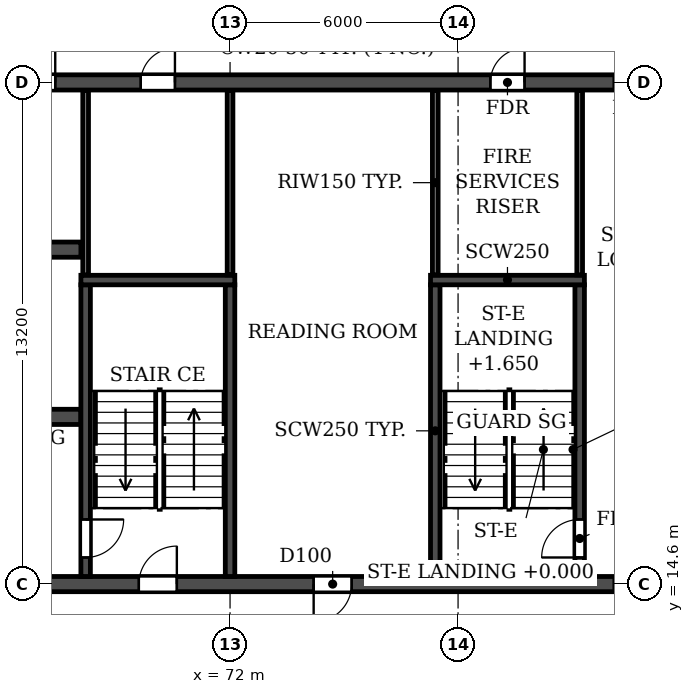
"""IFC4 building model, lengths in metres.
Left out: names, types, materials, properties, quantities, classifications, styles, units other than length and angle.
Written with IfcOpenShell. Run it as: python <this file> out.ifc"""

import sys

from ifc_helpers import new_model, si_unit, direction, frame, frame_2d, origin, place, context, subcontext, project, spatial, rectangle, extrude, element, fill, save


model = new_model("IFC4")
c1 = context("Model", 3, precision=1e-05, world=origin(), true_north=direction((0.0, 1.0)))
c2 = subcontext(c1, "Body", "Model", "MODEL_VIEW")
j1 = project(units=[si_unit("LENGTHUNIT", "METRE"), si_unit("PLANEANGLEUNIT", "RADIAN")], contexts=[c1])
p1 = place(None, origin())
s1 = spatial("IfcSite", under=j1, at=p1, CompositionType="ELEMENT")
p2 = place(p1, origin())
s2 = spatial("IfcBuilding", under=s1, at=p2, CompositionType="ELEMENT")
p3 = place(p2, frame((0.0, 0.0, 191.7)))
s3 = spatial("IfcBuildingStorey", under=s2, at=p3, CompositionType="ELEMENT", Elevation=191.7)
p4 = place(p3, frame((18.2, 14.6, 0.0), z_axis=(0.0, 0.0, 1.0), x_axis=(1.0, 0.0, 0.0)))
e1 = element("IfcWall", 1, at=p4, inside=s3, PredefinedType="SOLIDWALL", context=c2, shape_type="SweptSolid", body=[
    extrude(rectangle(XDim=65.6, YDim=0.4, at=frame_2d((32.8, 0.0))), origin(), (0.0, 0.0, 1.0), 3.08),
])
p5 = place(p4, frame((0.7, 0.0, 0.0)))
e2 = element("IfcOpeningElement", 2, at=p5, cuts=e1, PredefinedType="OPENING", context=c2, shape_type="SweptSolid", body=[
    extrude(rectangle(XDim=1.0, YDim=2.1, at=frame_2d((0.5, 1.05))), frame((0.0, 0.21, 0.0), z_axis=(0.0, -1.0, 0.0), x_axis=(1.0, 0.0, 0.0)), (0.0, 0.0, 1.0), 0.42),
])
p6 = place(p4, frame((8.6, 0.0, 0.0)))
e3 = element("IfcOpeningElement", 3, at=p6, cuts=e1, PredefinedType="OPENING", context=c2, shape_type="SweptSolid", body=[
    extrude(rectangle(XDim=1.0, YDim=2.1, at=frame_2d((0.5, 1.05))), frame((0.0, 0.21, 0.0), z_axis=(0.0, -1.0, 0.0), x_axis=(1.0, 0.0, 0.0)), (0.0, 0.0, 1.0), 0.42),
])
p7 = place(p4, frame((13.2, 0.0, 0.0)))
e4 = element("IfcOpeningElement", 4, at=p7, cuts=e1, PredefinedType="OPENING", context=c2, shape_type="SweptSolid", body=[
    extrude(rectangle(XDim=1.0, YDim=2.1, at=frame_2d((0.5, 1.05))), frame((0.0, 0.21, 0.0), z_axis=(0.0, -1.0, 0.0), x_axis=(1.0, 0.0, 0.0)), (0.0, 0.0, 1.0), 0.42),
])
p8 = place(p4, frame((25.55, 0.0, 0.0)))
e5 = element("IfcOpeningElement", 5, at=p8, cuts=e1, PredefinedType="OPENING", context=c2, shape_type="SweptSolid", body=[
    extrude(rectangle(XDim=1.5, YDim=2.1, at=frame_2d((0.75, 1.05))), frame((0.0, 0.21, 0.0), z_axis=(0.0, -1.0, 0.0), x_axis=(1.0, 0.0, 0.0)), (0.0, 0.0, 1.0), 0.42),
])
p9 = place(p4, frame((29.7, 0.0, 0.0)))
e6 = element("IfcOpeningElement", 6, at=p9, cuts=e1, PredefinedType="OPENING", context=c2, shape_type="SweptSolid", body=[
    extrude(rectangle(XDim=1.0, YDim=2.1, at=frame_2d((0.5, 1.05))), frame((0.0, 0.21, 0.0), z_axis=(0.0, -1.0, 0.0), x_axis=(1.0, 0.0, 0.0)), (0.0, 0.0, 1.0), 0.42),
])
p10 = place(p4, frame((32.3, 0.0, 0.0)))
e7 = element("IfcOpeningElement", 7, at=p10, cuts=e1, PredefinedType="OPENING", context=c2, shape_type="SweptSolid", body=[
    extrude(rectangle(XDim=1.0, YDim=2.1, at=frame_2d((0.5, 1.05))), frame((0.0, 0.21, 0.0), z_axis=(0.0, -1.0, 0.0), x_axis=(1.0, 0.0, 0.0)), (0.0, 0.0, 1.0), 0.42),
])
p11 = place(p4, frame((34.9, 0.0, 0.0)))
e8 = element("IfcOpeningElement", 8, at=p11, cuts=e1, PredefinedType="OPENING", context=c2, shape_type="SweptSolid", body=[
    extrude(rectangle(XDim=1.0, YDim=2.1, at=frame_2d((0.5, 1.05))), frame((0.0, 0.21, 0.0), z_axis=(0.0, -1.0, 0.0), x_axis=(1.0, 0.0, 0.0)), (0.0, 0.0, 1.0), 0.42),
])
p12 = place(p4, frame((38.55, 0.0, 0.0)))
e9 = element("IfcOpeningElement", 9, at=p12, cuts=e1, PredefinedType="OPENING", context=c2, shape_type="SweptSolid", body=[
    extrude(rectangle(XDim=1.5, YDim=2.1, at=frame_2d((0.75, 1.05))), frame((0.0, 0.21, 0.0), z_axis=(0.0, -1.0, 0.0), x_axis=(1.0, 0.0, 0.0)), (0.0, 0.0, 1.0), 0.42),
])
p13 = place(p4, frame((51.4, 0.0, 0.0)))
e10 = element("IfcOpeningElement", 10, at=p13, cuts=e1, PredefinedType="OPENING", context=c2, shape_type="SweptSolid", body=[
    extrude(rectangle(XDim=1.0, YDim=2.1, at=frame_2d((0.5, 1.05))), frame((0.0, 0.21, 0.0), z_axis=(0.0, -1.0, 0.0), x_axis=(1.0, 0.0, 0.0)), (0.0, 0.0, 1.0), 0.42),
])
p14 = place(p4, frame((56.0, 0.0, 0.0)))
e11 = element("IfcOpeningElement", 11, at=p14, cuts=e1, PredefinedType="OPENING", context=c2, shape_type="SweptSolid", body=[
    extrude(rectangle(XDim=1.0, YDim=2.1, at=frame_2d((0.5, 1.05))), frame((0.0, 0.21, 0.0), z_axis=(0.0, -1.0, 0.0), x_axis=(1.0, 0.0, 0.0)), (0.0, 0.0, 1.0), 0.42),
])
p15 = place(p4, frame((63.9, 0.0, 0.0)))
e12 = element("IfcOpeningElement", 12, at=p15, cuts=e1, PredefinedType="OPENING", context=c2, shape_type="SweptSolid", body=[
    extrude(rectangle(XDim=1.0, YDim=2.1, at=frame_2d((0.5, 1.05))), frame((0.0, 0.21, 0.0), z_axis=(0.0, -1.0, 0.0), x_axis=(1.0, 0.0, 0.0)), (0.0, 0.0, 1.0), 0.42),
])
p16 = place(p3, frame((18.2, 27.8, 0.0), z_axis=(0.0, 0.0, 1.0), x_axis=(1.0, 0.0, 0.0)))
e13 = element("IfcWall", 13, at=p16, inside=s3, PredefinedType="SOLIDWALL", context=c2, shape_type="SweptSolid", body=[
    extrude(rectangle(XDim=65.6, YDim=0.4, at=frame_2d((32.8, 0.0))), origin(), (0.0, 0.0, 1.0), 3.08),
])
p17 = place(p16, frame((0.7, 0.0, 0.0)))
e14 = element("IfcOpeningElement", 14, at=p17, cuts=e13, PredefinedType="OPENING", context=c2, shape_type="SweptSolid", body=[
    extrude(rectangle(XDim=1.0, YDim=2.1, at=frame_2d((0.5, 1.05))), frame((0.0, 0.21, 0.0), z_axis=(0.0, -1.0, 0.0), x_axis=(1.0, 0.0, 0.0)), (0.0, 0.0, 1.0), 0.42),
])
p18 = place(p16, frame((4.05, 0.0, 0.0)))
e15 = element("IfcOpeningElement", 15, at=p18, cuts=e13, PredefinedType="OPENING", context=c2, shape_type="SweptSolid", body=[
    extrude(rectangle(XDim=0.9, YDim=2.1, at=frame_2d((0.45, 1.05))), frame((0.0, 0.21, 0.0), z_axis=(0.0, -1.0, 0.0), x_axis=(1.0, 0.0, 0.0)), (0.0, 0.0, 1.0), 0.42),
])
p19 = place(p16, frame((13.25, 0.0, 0.0)))
e16 = element("IfcOpeningElement", 16, at=p19, cuts=e13, PredefinedType="OPENING", context=c2, shape_type="SweptSolid", body=[
    extrude(rectangle(XDim=0.9, YDim=2.1, at=frame_2d((0.45, 1.05))), frame((0.0, 0.21, 0.0), z_axis=(0.0, -1.0, 0.0), x_axis=(1.0, 0.0, 0.0)), (0.0, 0.0, 1.0), 0.42),
])
p20 = place(p16, frame((16.4, 0.0, 0.0)))
e17 = element("IfcOpeningElement", 17, at=p20, cuts=e13, PredefinedType="OPENING", context=c2, shape_type="SweptSolid", body=[
    extrude(rectangle(XDim=1.0, YDim=2.1, at=frame_2d((0.5, 1.05))), frame((0.0, 0.21, 0.0), z_axis=(0.0, -1.0, 0.0), x_axis=(1.0, 0.0, 0.0)), (0.0, 0.0, 1.0), 0.42),
])
p21 = place(p16, frame((21.6, 0.0, 0.0)))
e18 = element("IfcOpeningElement", 18, at=p21, cuts=e13, PredefinedType="OPENING", context=c2, shape_type="SweptSolid", body=[
    extrude(rectangle(XDim=1.0, YDim=2.1, at=frame_2d((0.5, 1.05))), frame((0.0, 0.21, 0.0), z_axis=(0.0, -1.0, 0.0), x_axis=(1.0, 0.0, 0.0)), (0.0, 0.0, 1.0), 0.42),
])
p22 = place(p16, frame((29.4, 0.0, 0.0)))
e19 = element("IfcOpeningElement", 19, at=p22, cuts=e13, PredefinedType="OPENING", context=c2, shape_type="SweptSolid", body=[
    extrude(rectangle(XDim=1.0, YDim=2.1, at=frame_2d((0.5, 1.05))), frame((0.0, 0.21, 0.0), z_axis=(0.0, -1.0, 0.0), x_axis=(1.0, 0.0, 0.0)), (0.0, 0.0, 1.0), 0.42),
])
p23 = place(p16, frame((32.3, 0.0, 0.0)))
e20 = element("IfcOpeningElement", 20, at=p23, cuts=e13, PredefinedType="OPENING", context=c2, shape_type="SweptSolid", body=[
    extrude(rectangle(XDim=1.0, YDim=2.1, at=frame_2d((0.5, 1.05))), frame((0.0, 0.21, 0.0), z_axis=(0.0, -1.0, 0.0), x_axis=(1.0, 0.0, 0.0)), (0.0, 0.0, 1.0), 0.42),
])
p24 = place(p16, frame((35.2, 0.0, 0.0)))
e21 = element("IfcOpeningElement", 21, at=p24, cuts=e13, PredefinedType="OPENING", context=c2, shape_type="SweptSolid", body=[
    extrude(rectangle(XDim=1.0, YDim=2.1, at=frame_2d((0.5, 1.05))), frame((0.0, 0.21, 0.0), z_axis=(0.0, -1.0, 0.0), x_axis=(1.0, 0.0, 0.0)), (0.0, 0.0, 1.0), 0.42),
])
p25 = place(p16, frame((37.8, 0.0, 0.0)))
e22 = element("IfcOpeningElement", 22, at=p25, cuts=e13, PredefinedType="OPENING", context=c2, shape_type="SweptSolid", body=[
    extrude(rectangle(XDim=1.0, YDim=2.1, at=frame_2d((0.5, 1.05))), frame((0.0, 0.21, 0.0), z_axis=(0.0, -1.0, 0.0), x_axis=(1.0, 0.0, 0.0)), (0.0, 0.0, 1.0), 0.42),
])
p26 = place(p16, frame((41.7, 0.0, 0.0)))
e23 = element("IfcOpeningElement", 23, at=p26, cuts=e13, PredefinedType="OPENING", context=c2, shape_type="SweptSolid", body=[
    extrude(rectangle(XDim=1.0, YDim=2.1, at=frame_2d((0.5, 1.05))), frame((0.0, 0.21, 0.0), z_axis=(0.0, -1.0, 0.0), x_axis=(1.0, 0.0, 0.0)), (0.0, 0.0, 1.0), 0.42),
])
p27 = place(p16, frame((45.6, 0.0, 0.0)))
e24 = element("IfcOpeningElement", 24, at=p27, cuts=e13, PredefinedType="OPENING", context=c2, shape_type="SweptSolid", body=[
    extrude(rectangle(XDim=1.0, YDim=2.1, at=frame_2d((0.5, 1.05))), frame((0.0, 0.21, 0.0), z_axis=(0.0, -1.0, 0.0), x_axis=(1.0, 0.0, 0.0)), (0.0, 0.0, 1.0), 0.42),
])
p28 = place(p16, frame((48.2, 0.0, 0.0)))
e25 = element("IfcOpeningElement", 25, at=p28, cuts=e13, PredefinedType="OPENING", context=c2, shape_type="SweptSolid", body=[
    extrude(rectangle(XDim=1.0, YDim=2.1, at=frame_2d((0.5, 1.05))), frame((0.0, 0.21, 0.0), z_axis=(0.0, -1.0, 0.0), x_axis=(1.0, 0.0, 0.0)), (0.0, 0.0, 1.0), 0.42),
])
p29 = place(p16, frame((51.45, 0.0, 0.0)))
e26 = element("IfcOpeningElement", 26, at=p29, cuts=e13, PredefinedType="OPENING", context=c2, shape_type="SweptSolid", body=[
    extrude(rectangle(XDim=0.9, YDim=2.1, at=frame_2d((0.45, 1.05))), frame((0.0, 0.21, 0.0), z_axis=(0.0, -1.0, 0.0), x_axis=(1.0, 0.0, 0.0)), (0.0, 0.0, 1.0), 0.42),
])
p30 = place(p16, frame((60.65, 0.0, 0.0)))
e27 = element("IfcOpeningElement", 27, at=p30, cuts=e13, PredefinedType="OPENING", context=c2, shape_type="SweptSolid", body=[
    extrude(rectangle(XDim=0.9, YDim=2.1, at=frame_2d((0.45, 1.05))), frame((0.0, 0.21, 0.0), z_axis=(0.0, -1.0, 0.0), x_axis=(1.0, 0.0, 0.0)), (0.0, 0.0, 1.0), 0.42),
])
p31 = place(p16, frame((63.9, 0.0, 0.0)))
e28 = element("IfcOpeningElement", 28, at=p31, cuts=e13, PredefinedType="OPENING", context=c2, shape_type="SweptSolid", body=[
    extrude(rectangle(XDim=1.0, YDim=2.1, at=frame_2d((0.5, 1.05))), frame((0.0, 0.21, 0.0), z_axis=(0.0, -1.0, 0.0), x_axis=(1.0, 0.0, 0.0)), (0.0, 0.0, 1.0), 0.42),
])
p32 = place(p3, frame((33.925, 19.0, 0.0), z_axis=(0.0, 0.0, 1.0), x_axis=(1.0, 0.0, 0.0)))
e29 = element("IfcWall", 29, at=p32, inside=s3, PredefinedType="SOLIDWALL", context=c2, shape_type="SweptSolid", body=[
    extrude(rectangle(XDim=34.15, YDim=0.4, at=frame_2d((17.075, 0.0))), origin(), (0.0, 0.0, 1.0), 3.08),
])
p33 = place(p32, frame((16.175, 0.0, 0.0)))
e30 = element("IfcOpeningElement", 30, at=p33, cuts=e29, PredefinedType="OPENING", context=c2, shape_type="SweptSolid", body=[
    extrude(rectangle(XDim=1.8, YDim=2.1, at=frame_2d((0.9, 1.05))), frame((0.0, 0.21, 0.0), z_axis=(0.0, -1.0, 0.0), x_axis=(1.0, 0.0, 0.0)), (0.0, 0.0, 1.0), 0.42),
])
p34 = place(p32, frame((1.525, 0.0, 0.0)))
e31 = element("IfcOpeningElement", 31, at=p34, cuts=e29, PredefinedType="OPENING", context=c2, shape_type="SweptSolid", body=[
    extrude(rectangle(XDim=1.8, YDim=2.1, at=frame_2d((0.9, 1.05))), frame((0.0, 0.21, 0.0), z_axis=(0.0, -1.0, 0.0), x_axis=(1.0, 0.0, 0.0)), (0.0, 0.0, 1.0), 0.42),
])
p35 = place(p32, frame((30.825, 0.0, 0.0)))
e32 = element("IfcOpeningElement", 32, at=p35, cuts=e29, PredefinedType="OPENING", context=c2, shape_type="SweptSolid", body=[
    extrude(rectangle(XDim=1.8, YDim=2.1, at=frame_2d((0.9, 1.05))), frame((0.0, 0.21, 0.0), z_axis=(0.0, -1.0, 0.0), x_axis=(1.0, 0.0, 0.0)), (0.0, 0.0, 1.0), 0.42),
])
p36 = place(p3, frame((33.925, 23.4, 0.0), z_axis=(0.0, 0.0, 1.0), x_axis=(1.0, 0.0, 0.0)))
e33 = element("IfcWall", 33, at=p36, inside=s3, PredefinedType="SOLIDWALL", context=c2, shape_type="SweptSolid", body=[
    extrude(rectangle(XDim=34.15, YDim=0.4, at=frame_2d((17.075, 0.0))), origin(), (0.0, 0.0, 1.0), 3.08),
])
p37 = place(p36, frame((16.175, 0.0, 0.0)))
e34 = element("IfcOpeningElement", 34, at=p37, cuts=e33, PredefinedType="OPENING", context=c2, shape_type="SweptSolid", body=[
    extrude(rectangle(XDim=1.8, YDim=2.1, at=frame_2d((0.9, 1.05))), frame((0.0, 0.21, 0.0), z_axis=(0.0, -1.0, 0.0), x_axis=(1.0, 0.0, 0.0)), (0.0, 0.0, 1.0), 0.42),
])
p38 = place(p36, frame((0.625, 0.0, 0.0)))
e35 = element("IfcOpeningElement", 35, at=p38, cuts=e33, PredefinedType="OPENING", context=c2, shape_type="SweptSolid", body=[
    extrude(rectangle(XDim=1.1, YDim=2.1, at=frame_2d((0.55, 1.05))), frame((0.0, 0.21, 0.0), z_axis=(0.0, -1.0, 0.0), x_axis=(1.0, 0.0, 0.0)), (0.0, 0.0, 1.0), 0.42),
])
p39 = place(p36, frame((3.225, 0.0, 0.0)))
e36 = element("IfcOpeningElement", 36, at=p39, cuts=e33, PredefinedType="OPENING", context=c2, shape_type="SweptSolid", body=[
    extrude(rectangle(XDim=1.1, YDim=2.1, at=frame_2d((0.55, 1.05))), frame((0.0, 0.21, 0.0), z_axis=(0.0, -1.0, 0.0), x_axis=(1.0, 0.0, 0.0)), (0.0, 0.0, 1.0), 0.42),
])
p40 = place(p36, frame((5.825, 0.0, 0.0)))
e37 = element("IfcOpeningElement", 37, at=p40, cuts=e33, PredefinedType="OPENING", context=c2, shape_type="SweptSolid", body=[
    extrude(rectangle(XDim=1.1, YDim=2.1, at=frame_2d((0.55, 1.05))), frame((0.0, 0.21, 0.0), z_axis=(0.0, -1.0, 0.0), x_axis=(1.0, 0.0, 0.0)), (0.0, 0.0, 1.0), 0.42),
])
p41 = place(p36, frame((8.425, 0.0, 0.0)))
e38 = element("IfcOpeningElement", 38, at=p41, cuts=e33, PredefinedType="OPENING", context=c2, shape_type="SweptSolid", body=[
    extrude(rectangle(XDim=1.1, YDim=2.1, at=frame_2d((0.55, 1.05))), frame((0.0, 0.21, 0.0), z_axis=(0.0, -1.0, 0.0), x_axis=(1.0, 0.0, 0.0)), (0.0, 0.0, 1.0), 0.42),
])
p42 = place(p36, frame((11.025, 0.0, 0.0)))
e39 = element("IfcOpeningElement", 39, at=p42, cuts=e33, PredefinedType="OPENING", context=c2, shape_type="SweptSolid", body=[
    extrude(rectangle(XDim=1.1, YDim=2.1, at=frame_2d((0.55, 1.05))), frame((0.0, 0.21, 0.0), z_axis=(0.0, -1.0, 0.0), x_axis=(1.0, 0.0, 0.0)), (0.0, 0.0, 1.0), 0.42),
])
p43 = place(p36, frame((13.625, 0.0, 0.0)))
e40 = element("IfcOpeningElement", 40, at=p43, cuts=e33, PredefinedType="OPENING", context=c2, shape_type="SweptSolid", body=[
    extrude(rectangle(XDim=1.1, YDim=2.1, at=frame_2d((0.55, 1.05))), frame((0.0, 0.21, 0.0), z_axis=(0.0, -1.0, 0.0), x_axis=(1.0, 0.0, 0.0)), (0.0, 0.0, 1.0), 0.42),
])
p44 = place(p36, frame((27.225, 0.0, 0.0)))
e41 = element("IfcOpeningElement", 41, at=p44, cuts=e33, PredefinedType="OPENING", context=c2, shape_type="SweptSolid", body=[
    extrude(rectangle(XDim=1.1, YDim=2.1, at=frame_2d((0.55, 1.05))), frame((0.0, 0.21, 0.0), z_axis=(0.0, -1.0, 0.0), x_axis=(1.0, 0.0, 0.0)), (0.0, 0.0, 1.0), 0.42),
])
p45 = place(p3, frame((68.2, 14.8, 0.0), z_axis=(0.0, 0.0, 1.0), x_axis=(0.0, 1.0, 0.0)))
e42 = element("IfcWall", 42, at=p45, inside=s3, PredefinedType="SOLIDWALL", context=c2, shape_type="SweptSolid", body=[
    extrude(rectangle(XDim=7.675, YDim=0.25, at=frame_2d((3.837, 0.0))), origin(), (0.0, 0.0, 1.0), 3.08),
])
p46 = place(p45, frame((0.5, 0.0, 0.0)))
e43 = element("IfcOpeningElement", 43, at=p46, cuts=e42, PredefinedType="OPENING", context=c2, shape_type="SweptSolid", body=[
    extrude(rectangle(XDim=1.0, YDim=2.1, at=frame_2d((0.5, 1.05))), frame((0.0, 0.135, 0.0), z_axis=(0.0, -1.0, 0.0), x_axis=(1.0, 0.0, 0.0)), (0.0, 0.0, 1.0), 0.27),
])
p47 = place(p3, frame((72.0, 14.8, 0.0), z_axis=(0.0, 0.0, 1.0), x_axis=(0.0, 1.0, 0.0)))
e44 = element("IfcWall", 44, at=p47, inside=s3, PredefinedType="SOLIDWALL", context=c2, shape_type="SweptSolid", body=[
    extrude(rectangle(XDim=7.675, YDim=0.25, at=frame_2d((3.837, 0.0))), origin(), (0.0, 0.0, 1.0), 3.08),
])
p48 = place(p3, frame((68.075, 22.6, 0.0), z_axis=(0.0, 0.0, 1.0), x_axis=(1.0, 0.0, 0.0)))
e45 = element("IfcWall", 45, at=p48, inside=s3, PredefinedType="SOLIDWALL", context=c2, shape_type="SweptSolid", body=[
    extrude(rectangle(XDim=4.05, YDim=0.25, at=frame_2d((2.025, 0.0))), origin(), (0.0, 0.0, 1.0), 3.08),
])
p49 = place(p3, frame((77.4, 14.8, 0.0), z_axis=(0.0, 0.0, 1.0), x_axis=(0.0, 1.0, 0.0)))
e46 = element("IfcWall", 46, at=p49, inside=s3, PredefinedType="SOLIDWALL", context=c2, shape_type="SweptSolid", body=[
    extrude(rectangle(XDim=7.675, YDim=0.25, at=frame_2d((3.837, 0.0))), origin(), (0.0, 0.0, 1.0), 3.08),
])
p50 = place(p3, frame((81.2, 14.8, 0.0), z_axis=(0.0, 0.0, 1.0), x_axis=(0.0, 1.0, 0.0)))
e47 = element("IfcWall", 47, at=p50, inside=s3, PredefinedType="SOLIDWALL", context=c2, shape_type="SweptSolid", body=[
    extrude(rectangle(XDim=7.675, YDim=0.25, at=frame_2d((3.837, 0.0))), origin(), (0.0, 0.0, 1.0), 3.08),
])
p51 = place(p50, frame((0.5, 0.0, 0.0)))
e48 = element("IfcOpeningElement", 48, at=p51, cuts=e47, PredefinedType="OPENING", context=c2, shape_type="SweptSolid", body=[
    extrude(rectangle(XDim=1.0, YDim=2.1, at=frame_2d((0.5, 1.05))), frame((0.0, 0.135, 0.0), z_axis=(0.0, -1.0, 0.0), x_axis=(1.0, 0.0, 0.0)), (0.0, 0.0, 1.0), 0.27),
])
p52 = place(p3, frame((77.275, 22.6, 0.0), z_axis=(0.0, 0.0, 1.0), x_axis=(1.0, 0.0, 0.0)))
e49 = element("IfcWall", 49, at=p52, inside=s3, PredefinedType="SOLIDWALL", context=c2, shape_type="SweptSolid", body=[
    extrude(rectangle(XDim=4.05, YDim=0.25, at=frame_2d((2.025, 0.0))), origin(), (0.0, 0.0, 1.0), 3.08),
])
for number, where, z_axis, x_axis in (
    (50, (68.2, 22.735, 0.0), (0.0, 0.0, 1.0), (0.0, 1.0, 0.0)),
    (51, (72.0, 22.735, 0.0), (0.0, 0.0, 1.0), (0.0, 1.0, 0.0)),
    (52, (77.4, 22.735, 0.0), (0.0, 0.0, 1.0), (0.0, 1.0, 0.0)),
    (53, (81.2, 22.735, 0.0), (0.0, 0.0, 1.0), (0.0, 1.0, 0.0)),
):
    element("IfcWall", number, at=place(p3, frame(where, z_axis=z_axis, x_axis=x_axis)), inside=s3, PredefinedType="PARTITIONING", context=c2, shape_type="SweptSolid", body=[
        extrude(rectangle(XDim=4.855, YDim=0.15, at=frame_2d((2.427, 0.0))), origin(), (0.0, 0.0, 1.0), 3.08),
    ])
p53 = place(p28, origin())
e54 = element("IfcDoor", 54, at=p53, inside=s3, OperationType="SINGLE_SWING_RIGHT", PredefinedType="DOOR", context=c2, shape_type="SweptSolid", body=[
    extrude(rectangle(XDim=1.0, YDim=2.1, at=frame_2d((0.5, 1.05))), frame((0.0, 0.025, 0.0), z_axis=(0.0, -1.0, 0.0), x_axis=(1.0, 0.0, 0.0)), (0.0, 0.0, 1.0), 0.05),
])
fill(e25, e54)
p54 = place(p29, origin())
e55 = element("IfcDoor", 55, at=p54, inside=s3, OperationType="SINGLE_SWING_RIGHT", PredefinedType="DOOR", context=c2, shape_type="SweptSolid", body=[
    extrude(rectangle(XDim=0.9, YDim=2.1, at=frame_2d((0.45, 1.05))), frame((0.0, 0.025, 0.0), z_axis=(0.0, -1.0, 0.0), x_axis=(1.0, 0.0, 0.0)), (0.0, 0.0, 1.0), 0.05),
])
fill(e26, e55)
p55 = place(p30, origin())
e56 = element("IfcDoor", 56, at=p55, inside=s3, OperationType="SINGLE_SWING_RIGHT", PredefinedType="DOOR", context=c2, shape_type="SweptSolid", body=[
    extrude(rectangle(XDim=0.9, YDim=2.1, at=frame_2d((0.45, 1.05))), frame((0.0, 0.025, 0.0), z_axis=(0.0, -1.0, 0.0), x_axis=(1.0, 0.0, 0.0)), (0.0, 0.0, 1.0), 0.05),
])
fill(e27, e56)
p56 = place(p31, origin())
e57 = element("IfcDoor", 57, at=p56, inside=s3, OperationType="SINGLE_SWING_RIGHT", PredefinedType="DOOR", context=c2, shape_type="SweptSolid", body=[
    extrude(rectangle(XDim=1.0, YDim=2.1, at=frame_2d((0.5, 1.05))), frame((0.0, 0.025, 0.0), z_axis=(0.0, -1.0, 0.0), x_axis=(1.0, 0.0, 0.0)), (0.0, 0.0, 1.0), 0.05),
])
fill(e28, e57)
p57 = place(p13, origin())
e58 = element("IfcDoor", 58, at=p57, inside=s3, OperationType="SINGLE_SWING_RIGHT", PredefinedType="DOOR", context=c2, shape_type="SweptSolid", body=[
    extrude(rectangle(XDim=1.0, YDim=2.1, at=frame_2d((0.5, 1.05))), frame((0.0, 0.025, 0.0), z_axis=(0.0, -1.0, 0.0), x_axis=(1.0, 0.0, 0.0)), (0.0, 0.0, 1.0), 0.05),
])
fill(e10, e58)
p58 = place(p14, frame((1.0, 0.0, 0.0), z_axis=(0.0, 0.0, 1.0), x_axis=(-1.0, 0.0, 0.0)))
e59 = element("IfcDoor", 59, at=p58, inside=s3, OperationType="SINGLE_SWING_RIGHT", PredefinedType="DOOR", context=c2, shape_type="SweptSolid", body=[
    extrude(rectangle(XDim=1.0, YDim=2.1, at=frame_2d((0.5, 1.05))), frame((0.0, 0.025, 0.0), z_axis=(0.0, -1.0, 0.0), x_axis=(1.0, 0.0, 0.0)), (0.0, 0.0, 1.0), 0.05),
])
fill(e11, e59)
p59 = place(p15, frame((1.0, 0.0, 0.0), z_axis=(0.0, 0.0, 1.0), x_axis=(-1.0, 0.0, 0.0)))
e60 = element("IfcDoor", 60, at=p59, inside=s3, OperationType="SINGLE_SWING_LEFT", PredefinedType="DOOR", context=c2, shape_type="SweptSolid", body=[
    extrude(rectangle(XDim=1.0, YDim=2.1, at=frame_2d((0.5, 1.05))), frame((0.0, 0.025, 0.0), z_axis=(0.0, -1.0, 0.0), x_axis=(1.0, 0.0, 0.0)), (0.0, 0.0, 1.0), 0.05),
])
fill(e12, e60)
p60 = place(p46, frame((1.0, 0.0, 0.0), z_axis=(0.0, 0.0, 1.0), x_axis=(-1.0, 0.0, 0.0)))
e61 = element("IfcDoor", 61, at=p60, inside=s3, OperationType="SINGLE_SWING_LEFT", PredefinedType="DOOR", context=c2, shape_type="SweptSolid", body=[
    extrude(rectangle(XDim=1.0, YDim=2.1, at=frame_2d((0.5, 1.05))), frame((0.0, 0.025, 0.0), z_axis=(0.0, -1.0, 0.0), x_axis=(1.0, 0.0, 0.0)), (0.0, 0.0, 1.0), 0.05),
])
fill(e43, e61)
p61 = place(p51, origin())
e62 = element("IfcDoor", 62, at=p61, inside=s3, OperationType="SINGLE_SWING_LEFT", PredefinedType="DOOR", context=c2, shape_type="SweptSolid", body=[
    extrude(rectangle(XDim=1.0, YDim=2.1, at=frame_2d((0.5, 1.05))), frame((0.0, 0.025, 0.0), z_axis=(0.0, -1.0, 0.0), x_axis=(1.0, 0.0, 0.0)), (0.0, 0.0, 1.0), 0.05),
])
fill(e48, e62)
save(model, sys.argv[1])
